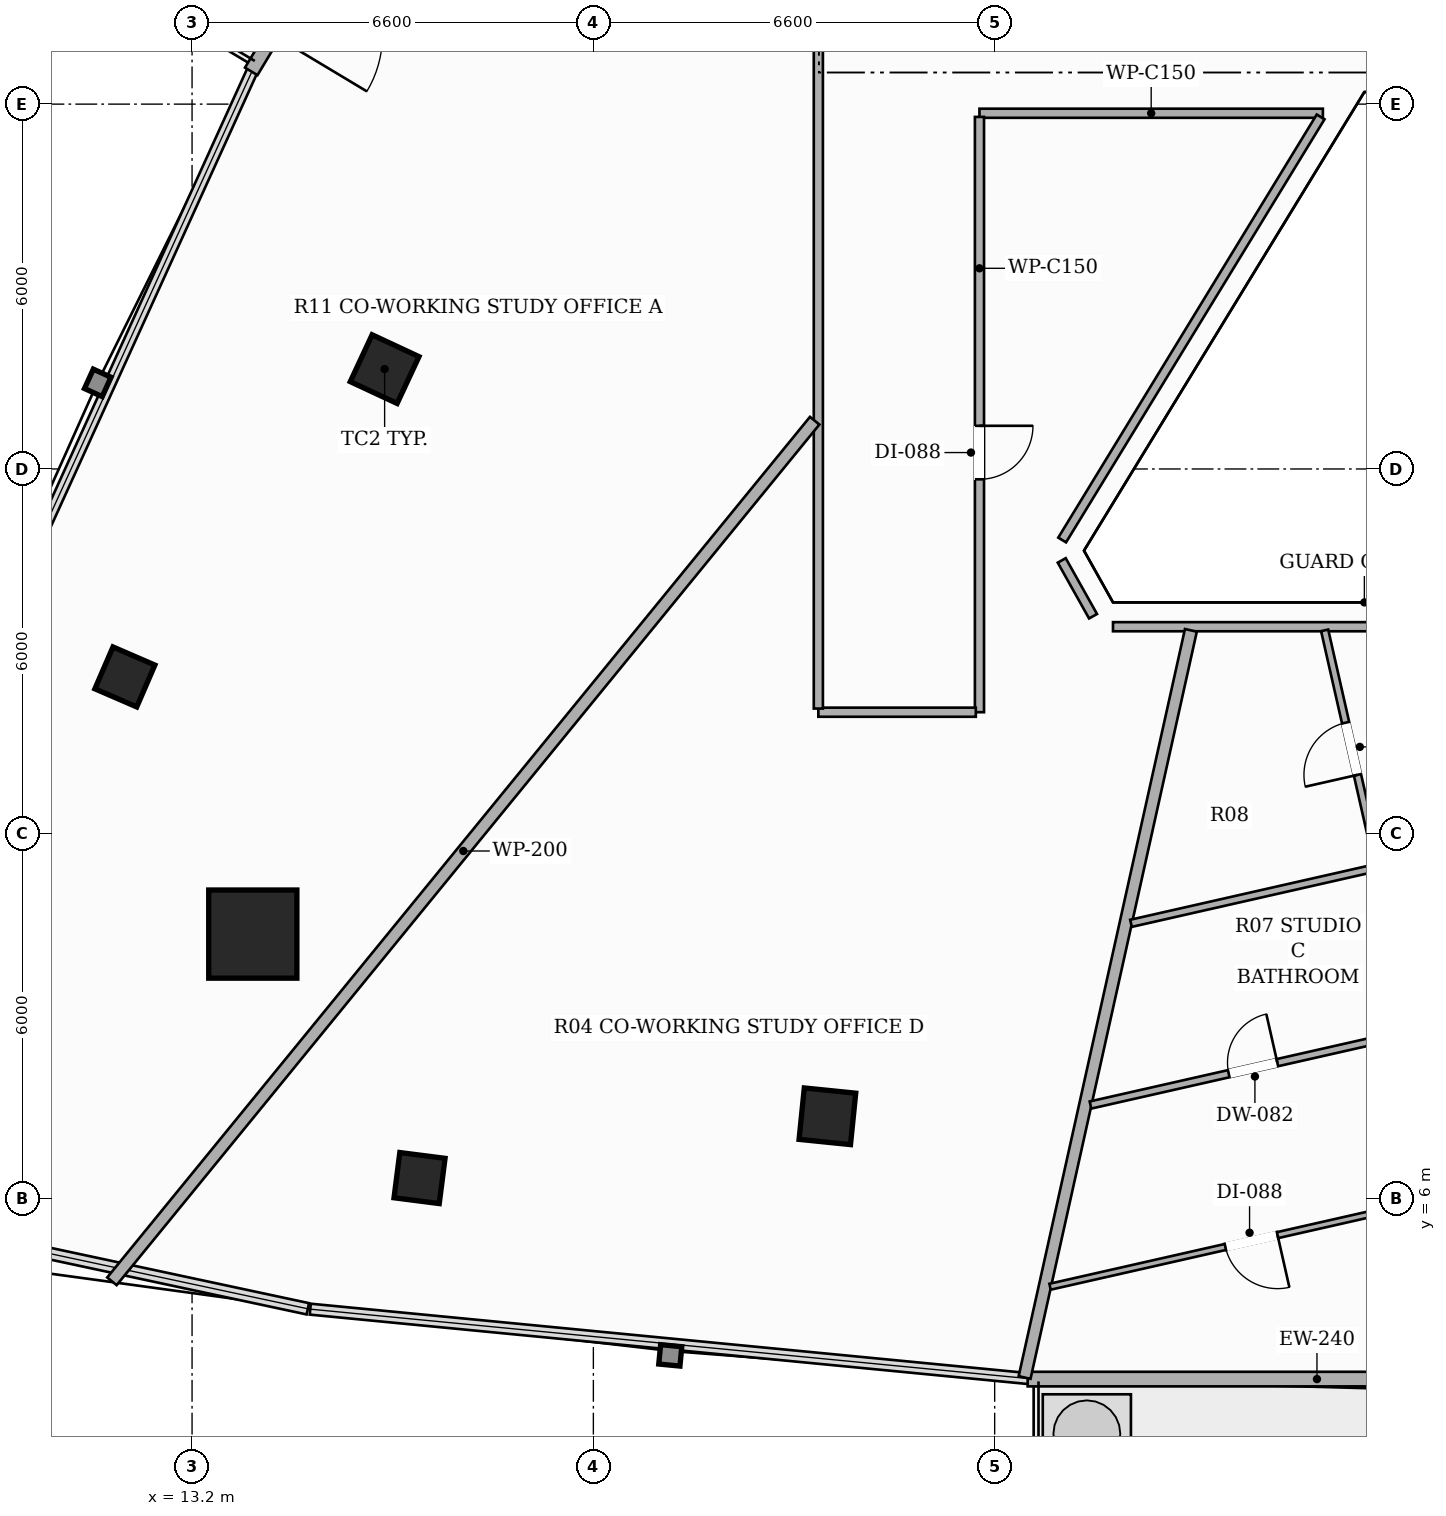
"""IFC4 building model, lengths in metres.
Left out: names, types, materials, properties, quantities, classifications, styles, units other than length and angle.
Written with IfcOpenShell. Run it as: python <this file> out.ifc"""

import sys

from ifc_helpers import new_model, si_unit, direction, frame, frame_2d, origin, origin_2d, place, context, subcontext, project, spatial, rectangle, hollow_rectangle, extrude, element, fill, save


model = new_model("IFC4")
c1 = context("Model", 3, precision=1e-05, world=origin(), true_north=direction((0.0, 1.0)))
c2 = subcontext(c1, "Body", "Model", "MODEL_VIEW")
j1 = project(units=[si_unit("LENGTHUNIT", "METRE"), si_unit("PLANEANGLEUNIT", "RADIAN")], contexts=[c1])
p1 = place(None, origin())
s1 = spatial("IfcSite", under=j1, at=p1, CompositionType="ELEMENT")
p2 = place(p1, origin())
s2 = spatial("IfcBuilding", under=s1, at=p2, CompositionType="ELEMENT")
p3 = place(p2, frame((0.0, 0.0, 116.6)))
s3 = spatial("IfcBuildingStorey", under=s2, at=p3, CompositionType="ELEMENT", Elevation=116.6)
p4 = place(p3, frame((14.199, 10.351, 0.0), z_axis=(0.0, 0.0, 1.0), x_axis=(1.0, 0.0, 0.0)))
e1 = element("IfcColumn", 1, at=p4, inside=s3, PredefinedType="COLUMN", context=c2, shape_type="SweptSolid", body=[
    extrude(hollow_rectangle(XDim=1.45, YDim=1.45, WallThickness=0.045, at=origin_2d()), origin(), (0.0, 0.0, 1.0), 3.3),
])
for number, where, z_axis, x_axis in (
    (2, (16.367, 19.642, 0.0), (0.0, 0.0, 1.0), (0.423, 0.906, 0.0)),
    (3, (23.649, 7.355, 0.0), (0.0, 0.0, 1.0), (-0.995, 0.101, 0.0)),
):
    element("IfcColumn", number, at=place(p3, frame(where, z_axis=z_axis, x_axis=x_axis)), inside=s3, PredefinedType="COLUMN", context=c2, shape_type="SweptSolid", body=[
        extrude(hollow_rectangle(XDim=0.85, YDim=0.85, WallThickness=0.028, at=origin_2d()), origin(), (0.0, 0.0, 1.0), 3.3),
    ])
for number, where, z_axis, x_axis in (
    (4, (12.095, 14.58, 0.0), (0.0, 0.0, 1.0), (0.397, 0.918, 0.0)),
    (5, (16.941, 6.339, 0.0), (0.0, 0.0, 1.0), (-0.992, 0.127, 0.0)),
):
    element("IfcColumn", number, at=place(p3, frame(where, z_axis=z_axis, x_axis=x_axis)), inside=s3, PredefinedType="COLUMN", context=c2, shape_type="SweptSolid", body=[
        extrude(hollow_rectangle(XDim=0.75, YDim=0.75, WallThickness=0.025, at=origin_2d()), origin(), (0.0, 0.0, 1.0), 3.3),
    ])
p5 = place(p3, frame((20.2, 34.586, 0.0), z_axis=(0.0, 0.0, 1.0), x_axis=(-0.514379309275, -0.857562782652, 0.0)))
e6 = element("IfcWall", 6, at=p5, inside=s3, PredefinedType="SOLIDWALL", context=c2, shape_type="SweptSolid", body=[
    extrude(rectangle(XDim=11.717, YDim=0.24, at=frame_2d((5.858, 0.0))), origin(), (0.0, 0.0, 1.0), 2.624),
])
p6 = place(p5, frame((9.22, 0.0, 0.0)))
e7 = element("IfcOpeningElement", 7, at=p6, cuts=e6, PredefinedType="OPENING", context=c2, shape_type="SweptSolid", body=[
    extrude(rectangle(XDim=1.8, YDim=2.2, at=frame_2d((0.9, 1.1))), frame((0.0, 0.13, 0.0), z_axis=(0.0, -1.0, 0.0), x_axis=(1.0, 0.0, 0.0)), (0.0, 0.0, 1.0), 0.26),
])
p7 = place(p3, frame((26.943, 3.033, 0.0), z_axis=(0.0, 0.0, 1.0), x_axis=(1.0, 0.0, 0.0)))
e8 = element("IfcWall", 8, at=p7, inside=s3, PredefinedType="SOLIDWALL", context=c2, shape_type="SweptSolid", body=[
    extrude(rectangle(XDim=12.114, YDim=0.24, at=frame_2d((6.057, 0.0))), origin(), (0.0, 0.0, 1.0), 2.624),
])
p8 = place(p7, frame((9.615, 0.0, 0.0)))
e9 = element("IfcOpeningElement", 9, at=p8, cuts=e8, PredefinedType="OPENING", context=c2, shape_type="SweptSolid", body=[
    extrude(rectangle(XDim=1.8, YDim=2.2, at=frame_2d((0.9, 1.1))), frame((0.0, 0.13, 0.0), z_axis=(0.0, -1.0, 0.0), x_axis=(1.0, 0.0, 0.0)), (0.0, 0.0, 1.0), 0.26),
])
p9 = place(p3, frame((31.798, 23.85, 0.0), z_axis=(0.0, 0.0, 1.0), x_axis=(-1.0, 0.0, 0.0)))
e10 = element("IfcWall", 10, at=p9, inside=s3, PredefinedType="PARTITIONING", context=c2, shape_type="SweptSolid", body=[
    extrude(rectangle(XDim=5.648, YDim=0.15, at=frame_2d((2.824, 0.0))), origin(), (0.0, 0.0, 1.0), 2.721),
])
p10 = place(p3, frame((26.15, 23.79, 0.0), z_axis=(0.0, 0.0, 1.0), x_axis=(0.0, -1.0, 0.0)))
e11 = element("IfcWall", 11, at=p10, inside=s3, PredefinedType="PARTITIONING", context=c2, shape_type="SweptSolid", body=[
    extrude(rectangle(XDim=9.79, YDim=0.15, at=frame_2d((4.895, 0.0))), origin(), (0.0, 0.0, 1.0), 2.721),
])
p11 = place(p10, frame((5.08, 0.0, 0.0)))
e12 = element("IfcOpeningElement", 12, at=p11, cuts=e11, PredefinedType="OPENING", context=c2, shape_type="SweptSolid", body=[
    extrude(rectangle(XDim=0.88, YDim=2.1, at=frame_2d((0.44, 1.05))), frame((0.0, 0.085, 0.0), z_axis=(0.0, -1.0, 0.0), x_axis=(1.0, 0.0, 0.0)), (0.0, 0.0, 1.0), 0.17),
])
p12 = place(p3, frame((26.09, 14.0, 0.0), z_axis=(0.0, 0.0, 1.0), x_axis=(-1.0, 0.0, 0.0)))
e13 = element("IfcWall", 13, at=p12, inside=s3, PredefinedType="PARTITIONING", context=c2, shape_type="SweptSolid", body=[
    extrude(rectangle(XDim=2.59, YDim=0.15, at=frame_2d((1.295, 0.0))), origin(), (0.0, 0.0, 1.0), 2.721),
])
p13 = place(p3, frame((23.5, 14.06, 0.0), z_axis=(0.0, 0.0, 1.0), x_axis=(0.0, 1.0, 0.0)))
e14 = element("IfcWall", 14, at=p13, inside=s3, PredefinedType="PARTITIONING", context=c2, shape_type="SweptSolid", body=[
    extrude(rectangle(XDim=22.84, YDim=0.15, at=frame_2d((11.42, 0.0))), origin(), (0.0, 0.0, 1.0), 2.413),
])
p14 = place(p13, frame((13.17, 0.0, 0.0)))
e15 = element("IfcOpeningElement", 15, at=p14, cuts=e14, PredefinedType="OPENING", context=c2, shape_type="SweptSolid", body=[
    extrude(rectangle(XDim=0.88, YDim=2.1, at=frame_2d((0.44, 1.05))), frame((0.0, 0.085, 0.0), z_axis=(0.0, -1.0, 0.0), x_axis=(1.0, 0.0, 0.0)), (0.0, 0.0, 1.0), 0.17),
])
p15 = place(p3, frame((37.654, 15.406, 0.0), z_axis=(0.0, 0.0, 1.0), x_axis=(-1.0, 0.0, 0.0)))
e16 = element("IfcWall", 16, at=p15, inside=s3, PredefinedType="PARTITIONING", context=c2, shape_type="SweptSolid", body=[
    extrude(rectangle(XDim=9.308, YDim=0.15, at=frame_2d((4.654, 0.0))), origin(), (0.0, 0.0, 1.0), 2.721),
])
p16 = place(p3, frame((28.018, 15.578, 0.0), z_axis=(0.0, 0.0, 1.0), x_axis=(-0.489281087794, 0.872126147485, 0.0)))
e17 = element("IfcWall", 17, at=p16, inside=s3, PredefinedType="PARTITIONING", context=c2, shape_type="SweptSolid", body=[
    extrude(rectangle(XDim=1.053, YDim=0.15, at=frame_2d((0.526, 0.0))), origin(), (0.0, 0.0, 1.0), 3.06),
])
p17 = place(p3, frame((27.51, 16.832, 0.0), z_axis=(0.0, 0.0, 1.0), x_axis=(0.521348270591, 0.853343999072, 0.0)))
e18 = element("IfcWall", 18, at=p17, inside=s3, PredefinedType="PARTITIONING", context=c2, shape_type="SweptSolid", body=[
    extrude(rectangle(XDim=8.154, YDim=0.15, at=frame_2d((4.077, 0.0))), origin(), (0.0, 0.0, 1.0), 2.721),
])
p18 = place(p3, frame((23.44, 18.794, 0.0), z_axis=(0.0, 0.0, 1.0), x_axis=(-0.632525219644, -0.774539764321, 0.0)))
e19 = element("IfcWall", 19, at=p18, inside=s3, PredefinedType="PARTITIONING", context=c2, shape_type="SweptSolid", body=[
    extrude(rectangle(XDim=18.272, YDim=0.2, at=frame_2d((9.136, 0.0))), origin(), (0.0, 0.0, 1.0), 2.413),
])
p19 = place(p3, frame((26.892, 3.059, 0.0), z_axis=(0.0, 0.0, 1.0), x_axis=(0.217267240277, 0.97611215867, 0.0)))
e20 = element("IfcWall", 20, at=p19, inside=s3, PredefinedType="PARTITIONING", context=c2, shape_type="SweptSolid", body=[
    extrude(rectangle(XDim=12.588, YDim=0.2, at=frame_2d((6.294, 0.0))), origin(), (0.0, 0.0, 1.0), 2.413),
])
p20 = place(p3, frame((27.976, 7.54, 0.0), z_axis=(0.0, 0.0, 1.0), x_axis=(0.975262605336, 0.221049430295, 0.0)))
e21 = element("IfcWall", 21, at=p20, inside=s3, PredefinedType="PARTITIONING", context=c2, shape_type="SweptSolid", body=[
    extrude(rectangle(XDim=5.483, YDim=0.12, at=frame_2d((2.741, 0.0))), origin(), (0.0, 0.0, 1.0), 2.413),
])
p21 = place(p20, frame((2.331, 0.0, 0.0)))
e22 = element("IfcOpeningElement", 22, at=p21, cuts=e21, PredefinedType="OPENING", context=c2, shape_type="SweptSolid", body=[
    extrude(rectangle(XDim=0.82, YDim=2.1, at=frame_2d((0.41, 1.05))), frame((0.0, 0.07, 0.0), z_axis=(0.0, -1.0, 0.0), x_axis=(1.0, 0.0, 0.0)), (0.0, 0.0, 1.0), 0.14),
])
p22 = place(p3, frame((32.711, 11.451, 0.0), z_axis=(0.0, 0.0, 1.0), x_axis=(-0.221335761288, 0.975197662413, 0.0)))
e23 = element("IfcWall", 23, at=p22, inside=s3, PredefinedType="PARTITIONING", context=c2, shape_type="SweptSolid", body=[
    extrude(rectangle(XDim=3.994, YDim=0.12, at=frame_2d((1.997, 0.0))), origin(), (0.0, 0.0, 1.0), 2.721),
])
p23 = place(p22, frame((1.557, 0.0, 0.0)))
e24 = element("IfcOpeningElement", 24, at=p23, cuts=e23, PredefinedType="OPENING", context=c2, shape_type="SweptSolid", body=[
    extrude(rectangle(XDim=0.88, YDim=2.1, at=frame_2d((0.44, 1.05))), frame((0.0, 0.07, 0.0), z_axis=(0.0, -1.0, 0.0), x_axis=(1.0, 0.0, 0.0)), (0.0, 0.0, 1.0), 0.14),
])
p24 = place(p3, frame((33.935, 6.054, 0.0), z_axis=(0.0, 0.0, 1.0), x_axis=(-0.975244308244, -0.221130140952, 0.0)))
e25 = element("IfcWall", 25, at=p24, inside=s3, PredefinedType="PARTITIONING", context=c2, shape_type="SweptSolid", body=[
    extrude(rectangle(XDim=6.792, YDim=0.1, at=frame_2d((3.396, 0.0))), origin(), (0.0, 0.0, 1.0), 3.06),
])
p25 = place(p24, frame((2.956, 0.0, 0.0)))
e26 = element("IfcOpeningElement", 26, at=p25, cuts=e25, PredefinedType="OPENING", context=c2, shape_type="SweptSolid", body=[
    extrude(rectangle(XDim=0.88, YDim=2.1, at=frame_2d((0.44, 1.05))), frame((0.0, 0.06, 0.0), z_axis=(0.0, -1.0, 0.0), x_axis=(1.0, 0.0, 0.0)), (0.0, 0.0, 1.0), 0.12),
])
p26 = place(p3, frame((28.642, 10.528, 0.0), z_axis=(0.0, 0.0, 1.0), x_axis=(0.975230479555, 0.221191120408, 0.0)))
e27 = element("IfcWall", 27, at=p26, inside=s3, PredefinedType="PARTITIONING", context=c2, shape_type="SweptSolid", body=[
    extrude(rectangle(XDim=4.172, YDim=0.12, at=frame_2d((2.086, 0.0))), origin(), (0.0, 0.0, 1.0), 2.721),
])
p27 = place(p21, origin())
e28 = element("IfcDoor", 28, at=p27, inside=s3, OperationType="SINGLE_SWING_RIGHT", PredefinedType="DOOR", context=c2, shape_type="SweptSolid", body=[
    extrude(rectangle(XDim=0.82, YDim=2.1, at=frame_2d((0.41, 1.05))), frame((0.0, 0.025, 0.0), z_axis=(0.0, -1.0, 0.0), x_axis=(1.0, 0.0, 0.0)), (0.0, 0.0, 1.0), 0.05),
])
fill(e22, e28)
p28 = place(p23, origin())
e29 = element("IfcDoor", 29, at=p28, inside=s3, OperationType="SINGLE_SWING_LEFT", PredefinedType="DOOR", context=c2, shape_type="SweptSolid", body=[
    extrude(rectangle(XDim=0.88, YDim=2.1, at=frame_2d((0.44, 1.05))), frame((0.0, 0.025, 0.0), z_axis=(0.0, -1.0, 0.0), x_axis=(1.0, 0.0, 0.0)), (0.0, 0.0, 1.0), 0.05),
])
fill(e24, e29)
p29 = place(p25, origin())
e30 = element("IfcDoor", 30, at=p29, inside=s3, OperationType="SINGLE_SWING_LEFT", PredefinedType="DOOR", context=c2, shape_type="SweptSolid", body=[
    extrude(rectangle(XDim=0.88, YDim=2.1, at=frame_2d((0.44, 1.05))), frame((0.0, 0.025, 0.0), z_axis=(0.0, -1.0, 0.0), x_axis=(1.0, 0.0, 0.0)), (0.0, 0.0, 1.0), 0.05),
])
fill(e26, e30)
p30 = place(p11, origin())
e31 = element("IfcDoor", 31, at=p30, inside=s3, OperationType="SINGLE_SWING_LEFT", PredefinedType="DOOR", context=c2, shape_type="SweptSolid", body=[
    extrude(rectangle(XDim=0.88, YDim=2.1, at=frame_2d((0.44, 1.05))), frame((0.0, 0.025, 0.0), z_axis=(0.0, -1.0, 0.0), x_axis=(1.0, 0.0, 0.0)), (0.0, 0.0, 1.0), 0.05),
])
fill(e12, e31)
save(model, sys.argv[1])
